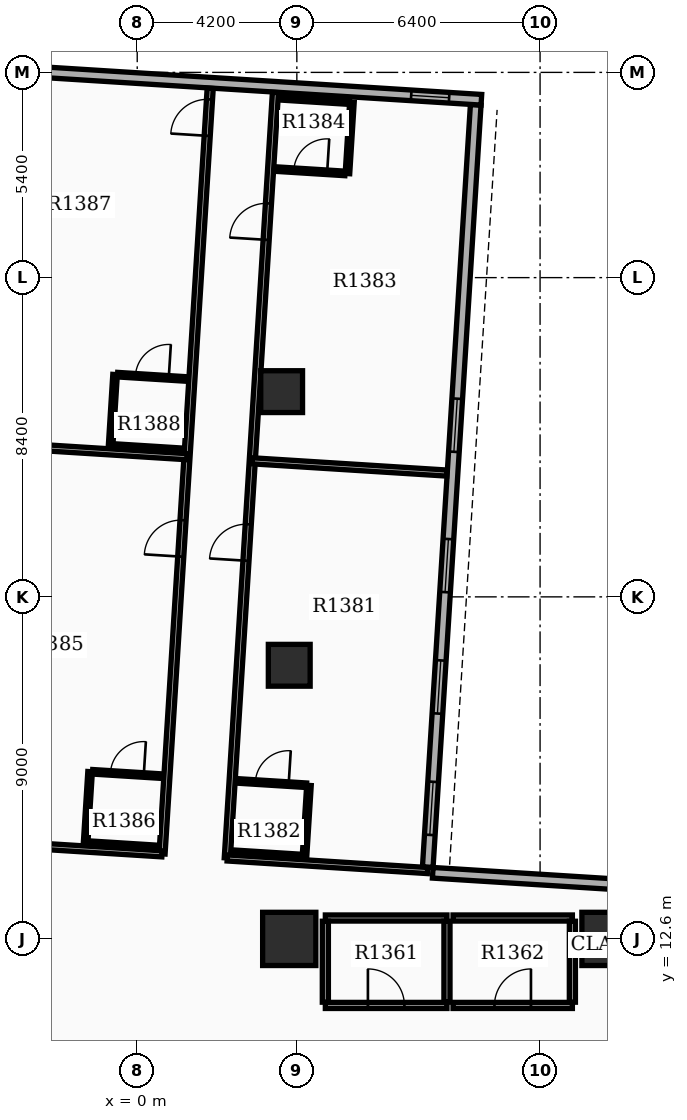
"""IFC4 building model, lengths in metres.
Left out: names, types, materials, properties, quantities, classifications, styles, units other than length and angle.
Written with IfcOpenShell. Run it as: python <this file> out.ifc"""

import sys

from ifc_helpers import new_model, si_unit, direction, frame, frame_2d, origin, origin_2d, place, context, subcontext, project, spatial, rectangle, extrude, element, fill, save


model = new_model("IFC4")
c1 = context("Model", 3, precision=1e-05, world=origin(), true_north=direction((0.0, 1.0)))
c2 = subcontext(c1, "Body", "Model", "MODEL_VIEW")
j1 = project(units=[si_unit("LENGTHUNIT", "METRE"), si_unit("PLANEANGLEUNIT", "RADIAN")], contexts=[c1])
p1 = place(None, origin())
s1 = spatial("IfcSite", under=j1, at=p1, CompositionType="ELEMENT")
p2 = place(p1, origin())
s2 = spatial("IfcBuilding", under=s1, at=p2, CompositionType="ELEMENT")
p3 = place(p2, frame((0.0, 0.0, 87.3)))
s3 = spatial("IfcBuildingStorey", under=s2, at=p3, CompositionType="ELEMENT", Elevation=87.3)
for number, where, z_axis, x_axis in (
    (1, (12.4, 12.6, 0.0), (0.0, 0.0, 1.0), (1.0, 0.0, 0.0)),
    (2, (4.0, 12.6, 0.0), (0.0, 0.0, 1.0), (1.0, 0.0, 0.0)),
):
    element("IfcColumn", number, at=place(p3, frame(where, z_axis=z_axis, x_axis=x_axis)), inside=s3, PredefinedType="COLUMN", context=c2, shape_type="SweptSolid", body=[
        extrude(rectangle(XDim=1.4, YDim=1.4, at=origin_2d()), origin(), (0.0, 0.0, 1.0), 3.9),
    ])
for number, where, z_axis, x_axis in (
    (3, (4.0, 19.8, 0.0), (0.0, 0.0, 1.0), (1.0, 0.0, 0.0)),
    (4, (3.8, 27.0, 0.0), (0.0, 0.0, 1.0), (1.0, 0.0, 0.0)),
):
    element("IfcColumn", number, at=place(p3, frame(where, z_axis=z_axis, x_axis=x_axis)), inside=s3, PredefinedType="COLUMN", context=c2, shape_type="SweptSolid", body=[
        extrude(rectangle(XDim=1.1, YDim=1.1, at=origin_2d()), origin(), (0.0, 0.0, 1.0), 3.9),
    ])
p4 = place(p3, frame((7.645, 14.489, 0.0), z_axis=(0.0, 0.0, 1.0), x_axis=(0.06279645424, 0.99802635503, 0.0)))
e5 = element("IfcWall", 5, at=p4, inside=s3, PredefinedType="STANDARD", context=c2, shape_type="SweptSolid", body=[
    extrude(rectangle(XDim=20.1, YDim=0.28, at=frame_2d((10.05, 0.0))), origin(), (0.0, 0.0, 1.0), 2.91),
])
p5 = place(p4, frame((0.85, 0.0, 0.8)))
e6 = element("IfcOpeningElement", 6, at=p5, cuts=e5, PredefinedType="OPENING", context=c2, shape_type="SweptSolid", body=[
    extrude(rectangle(XDim=1.4, YDim=1.6, at=frame_2d((0.7, 0.8))), frame((0.0, 0.15, 0.0), z_axis=(0.0, -1.0, 0.0), x_axis=(1.0, 0.0, 0.0)), (0.0, 0.0, 1.0), 0.3),
])
p6 = place(p4, frame((4.05, 0.0, 0.8)))
e7 = element("IfcOpeningElement", 7, at=p6, cuts=e5, PredefinedType="OPENING", context=c2, shape_type="SweptSolid", body=[
    extrude(rectangle(XDim=1.4, YDim=1.6, at=frame_2d((0.7, 0.8))), frame((0.0, 0.15, 0.0), z_axis=(0.0, -1.0, 0.0), x_axis=(1.0, 0.0, 0.0)), (0.0, 0.0, 1.0), 0.3),
])
p7 = place(p4, frame((7.25, 0.0, 0.8)))
e8 = element("IfcOpeningElement", 8, at=p7, cuts=e5, PredefinedType="OPENING", context=c2, shape_type="SweptSolid", body=[
    extrude(rectangle(XDim=1.4, YDim=1.6, at=frame_2d((0.7, 0.8))), frame((0.0, 0.15, 0.0), z_axis=(0.0, -1.0, 0.0), x_axis=(1.0, 0.0, 0.0)), (0.0, 0.0, 1.0), 0.3),
])
p8 = place(p4, frame((10.95, 0.0, 0.8)))
e9 = element("IfcOpeningElement", 9, at=p8, cuts=e5, PredefinedType="OPENING", context=c2, shape_type="SweptSolid", body=[
    extrude(rectangle(XDim=1.4, YDim=1.6, at=frame_2d((0.7, 0.8))), frame((0.0, 0.15, 0.0), z_axis=(0.0, -1.0, 0.0), x_axis=(1.0, 0.0, 0.0)), (0.0, 0.0, 1.0), 0.3),
])
p9 = place(p3, frame((9.055, 34.68, 0.0), z_axis=(0.0, 0.0, 1.0), x_axis=(-0.998026318072, 0.062797041623, 0.0)))
e10 = element("IfcWall", 10, at=p9, inside=s3, PredefinedType="STANDARD", context=c2, shape_type="SweptSolid", body=[
    extrude(rectangle(XDim=13.72, YDim=0.28, at=frame_2d((6.86, 0.0))), origin(), (0.0, 0.0, 1.0), 2.91),
])
p10 = place(p9, frame((0.85, 0.0, 0.85)))
e11 = element("IfcOpeningElement", 11, at=p10, cuts=e10, PredefinedType="OPENING", context=c2, shape_type="SweptSolid", body=[
    extrude(rectangle(XDim=1.0, YDim=1.5, at=frame_2d((0.5, 0.75))), frame((0.0, 0.15, 0.0), z_axis=(0.0, -1.0, 0.0), x_axis=(1.0, 0.0, 0.0)), (0.0, 0.0, 1.0), 0.3),
])
p11 = place(p3, frame((14.063, 13.945, 0.0), z_axis=(0.0, 0.0, 1.0), x_axis=(-0.998027314704, 0.062781200242, 0.0)))
e12 = element("IfcWall", 12, at=p11, inside=s3, PredefinedType="STANDARD", context=c2, shape_type="SweptSolid", body=[
    extrude(rectangle(XDim=6.3, YDim=0.28, at=frame_2d((3.15, 0.0))), origin(), (0.0, 0.0, 1.0), 2.91),
])
p12 = place(p3, frame((4.95, 10.85, 0.0), z_axis=(0.0, 0.0, 1.0), x_axis=(1.0, 0.0, 0.0)))
e13 = element("IfcWall", 13, at=p12, inside=s3, PredefinedType="PARTITIONING", context=c2, shape_type="SweptSolid", body=[
    extrude(rectangle(XDim=3.2, YDim=0.16, at=frame_2d((1.6, 0.0))), origin(), (0.0, 0.0, 1.0), 2.9),
])
p13 = place(p12, frame((1.12, 0.0, 0.0)))
e14 = element("IfcOpeningElement", 14, at=p13, cuts=e13, PredefinedType="OPENING", context=c2, shape_type="SweptSolid", body=[
    extrude(rectangle(XDim=0.96, YDim=2.15, at=frame_2d((0.48, 1.075))), frame((0.0, 0.09, 0.0), z_axis=(0.0, -1.0, 0.0), x_axis=(1.0, 0.0, 0.0)), (0.0, 0.0, 1.0), 0.18),
])
p14 = place(p3, frame((4.95, 13.15, 0.0), z_axis=(0.0, 0.0, 1.0), x_axis=(1.0, 0.0, 0.0)))
e15 = element("IfcWall", 15, at=p14, inside=s3, PredefinedType="PARTITIONING", context=c2, shape_type="SweptSolid", body=[
    extrude(rectangle(XDim=3.2, YDim=0.16, at=frame_2d((1.6, 0.0))), origin(), (0.0, 0.0, 1.0), 2.9),
])
for number, where, z_axis, x_axis in (
    (16, (4.95, 10.935, 0.0), (0.0, 0.0, 1.0), (0.0, 1.0, 0.0)),
    (17, (8.15, 10.935, 0.0), (0.0, 0.0, 1.0), (0.0, 1.0, 0.0)),
):
    element("IfcWall", number, at=place(p3, frame(where, z_axis=z_axis, x_axis=x_axis)), inside=s3, PredefinedType="PARTITIONING", context=c2, shape_type="SweptSolid", body=[
        extrude(rectangle(XDim=2.13, YDim=0.16, at=frame_2d((1.065, 0.0))), origin(), (0.0, 0.0, 1.0), 2.9),
    ])
p15 = place(p3, frame((8.31, 10.85, 0.0), z_axis=(0.0, 0.0, 1.0), x_axis=(1.0, 0.0, 0.0)))
e18 = element("IfcWall", 18, at=p15, inside=s3, PredefinedType="PARTITIONING", context=c2, shape_type="SweptSolid", body=[
    extrude(rectangle(XDim=3.14, YDim=0.16, at=frame_2d((1.57, 0.0))), origin(), (0.0, 0.0, 1.0), 2.9),
])
p16 = place(p15, frame((1.09, 0.0, 0.0)))
e19 = element("IfcOpeningElement", 19, at=p16, cuts=e18, PredefinedType="OPENING", context=c2, shape_type="SweptSolid", body=[
    extrude(rectangle(XDim=0.96, YDim=2.15, at=frame_2d((0.48, 1.075))), frame((0.0, 0.09, 0.0), z_axis=(0.0, -1.0, 0.0), x_axis=(1.0, 0.0, 0.0)), (0.0, 0.0, 1.0), 0.18),
])
p17 = place(p3, frame((8.31, 13.15, 0.0), z_axis=(0.0, 0.0, 1.0), x_axis=(1.0, 0.0, 0.0)))
e20 = element("IfcWall", 20, at=p17, inside=s3, PredefinedType="PARTITIONING", context=c2, shape_type="SweptSolid", body=[
    extrude(rectangle(XDim=3.14, YDim=0.16, at=frame_2d((1.57, 0.0))), origin(), (0.0, 0.0, 1.0), 2.9),
])
p18 = place(p3, frame((11.45, 10.935, 0.0), z_axis=(0.0, 0.0, 1.0), x_axis=(0.0, 1.0, 0.0)))
e21 = element("IfcWall", 21, at=p18, inside=s3, PredefinedType="PARTITIONING", context=c2, shape_type="SweptSolid", body=[
    extrude(rectangle(XDim=2.13, YDim=0.16, at=frame_2d((1.065, 0.0))), origin(), (0.0, 0.0, 1.0), 2.9),
])
p19 = place(p3, frame((2.37, 14.73, 0.0), z_axis=(0.0, 0.0, 1.0), x_axis=(0.062783460104, 0.998027172545, 0.0)))
e22 = element("IfcWall", 22, at=p19, inside=s3, PredefinedType="PARTITIONING", context=c2, shape_type="SweptSolid", body=[
    extrude(rectangle(XDim=20.182, YDim=0.16, at=frame_2d((10.091, 0.0))), origin(), (0.0, 0.0, 1.0), 2.9),
])
p20 = place(p19, frame((7.836, 0.0, 0.0)))
e23 = element("IfcOpeningElement", 23, at=p20, cuts=e22, PredefinedType="OPENING", context=c2, shape_type="SweptSolid", body=[
    extrude(rectangle(XDim=0.96, YDim=2.15, at=frame_2d((0.48, 1.075))), frame((0.0, 0.09, 0.0), z_axis=(0.0, -1.0, 0.0), x_axis=(1.0, 0.0, 0.0)), (0.0, 0.0, 1.0), 0.18),
])
p21 = place(p19, frame((16.296, 0.0, 0.0)))
e24 = element("IfcOpeningElement", 24, at=p21, cuts=e22, PredefinedType="OPENING", context=c2, shape_type="SweptSolid", body=[
    extrude(rectangle(XDim=0.96, YDim=2.15, at=frame_2d((0.48, 1.075))), frame((0.0, 0.09, 0.0), z_axis=(0.0, -1.0, 0.0), x_axis=(1.0, 0.0, 0.0)), (0.0, 0.0, 1.0), 0.18),
])
p22 = place(p3, frame((2.37, 14.73, 0.0), z_axis=(0.0, 0.0, 1.0), x_axis=(0.998026584059, -0.062792814175, 0.0)))
e25 = element("IfcWall", 25, at=p22, inside=s3, PredefinedType="PARTITIONING", context=c2, shape_type="SweptSolid", body=[
    extrude(rectangle(XDim=5.28, YDim=0.16, at=frame_2d((2.64, 0.0))), origin(), (0.0, 0.0, 1.0), 2.9),
])
p23 = place(p3, frame((3.027, 25.18, 0.0), z_axis=(0.0, 0.0, 1.0), x_axis=(0.998026390953, -0.062795883315, 0.0)))
e26 = element("IfcWall", 26, at=p23, inside=s3, PredefinedType="PARTITIONING", context=c2, shape_type="SweptSolid", body=[
    extrude(rectangle(XDim=5.132, YDim=0.16, at=frame_2d((2.566, 0.0))), origin(), (0.0, 0.0, 1.0), 2.9),
])
p24 = place(p3, frame((2.637, 16.758, 0.0), z_axis=(0.0, 0.0, 1.0), x_axis=(0.998027443946, -0.062779145668, 0.0)))
e27 = element("IfcWall", 27, at=p24, inside=s3, PredefinedType="PARTITIONING", context=c2, shape_type="SweptSolid", body=[
    extrude(rectangle(XDim=1.82, YDim=0.12, at=frame_2d((0.91, 0.0))), origin(), (0.0, 0.0, 1.0), 2.9),
])
p25 = place(p24, frame((0.47, 0.0, 0.0)))
e28 = element("IfcOpeningElement", 28, at=p25, cuts=e27, PredefinedType="OPENING", context=c2, shape_type="SweptSolid", body=[
    extrude(rectangle(XDim=0.88, YDim=2.1, at=frame_2d((0.44, 1.05))), frame((0.0, 0.07, 0.0), z_axis=(0.0, -1.0, 0.0), x_axis=(1.0, 0.0, 0.0)), (0.0, 0.0, 1.0), 0.14),
])
p26 = place(p3, frame((2.519, 14.881, 0.0), z_axis=(0.0, 0.0, 1.0), x_axis=(0.998027443946, -0.062779145668, 0.0)))
e29 = element("IfcWall", 29, at=p26, inside=s3, PredefinedType="PARTITIONING", context=c2, shape_type="SweptSolid", body=[
    extrude(rectangle(XDim=1.82, YDim=0.12, at=frame_2d((0.91, 0.0))), origin(), (0.0, 0.0, 1.0), 2.9),
])
p27 = place(p3, frame((4.401, 14.763, 0.0), z_axis=(0.0, 0.0, 1.0), x_axis=(0.062847152131, 0.998023163794, 0.0)))
e30 = element("IfcWall", 30, at=p27, inside=s3, PredefinedType="PARTITIONING", context=c2, shape_type="SweptSolid", body=[
    extrude(rectangle(XDim=1.88, YDim=0.12, at=frame_2d((0.94, 0.0))), origin(), (0.0, 0.0, 1.0), 2.9),
])
p28 = place(p3, frame((3.65, 32.856, 0.0), z_axis=(0.0, 0.0, 1.0), x_axis=(0.998027443946, -0.062779145668, 0.0)))
e31 = element("IfcWall", 31, at=p28, inside=s3, PredefinedType="PARTITIONING", context=c2, shape_type="SweptSolid", body=[
    extrude(rectangle(XDim=1.82, YDim=0.12, at=frame_2d((0.91, 0.0))), origin(), (0.0, 0.0, 1.0), 2.9),
])
p29 = place(p28, frame((0.47, 0.0, 0.0)))
e32 = element("IfcOpeningElement", 32, at=p29, cuts=e31, PredefinedType="OPENING", context=c2, shape_type="SweptSolid", body=[
    extrude(rectangle(XDim=0.88, YDim=2.1, at=frame_2d((0.44, 1.05))), frame((0.0, 0.07, 0.0), z_axis=(0.0, -1.0, 0.0), x_axis=(1.0, 0.0, 0.0)), (0.0, 0.0, 1.0), 0.14),
])
p30 = place(p3, frame((3.768, 34.732, 0.0), z_axis=(0.0, 0.0, 1.0), x_axis=(0.998027443946, -0.062779145668, 0.0)))
e33 = element("IfcWall", 33, at=p30, inside=s3, PredefinedType="PARTITIONING", context=c2, shape_type="SweptSolid", body=[
    extrude(rectangle(XDim=1.82, YDim=0.12, at=frame_2d((0.91, 0.0))), origin(), (0.0, 0.0, 1.0), 2.9),
])
p31 = place(p3, frame((5.531, 32.737, 0.0), z_axis=(0.0, 0.0, 1.0), x_axis=(0.062855297722, 0.998022650819, 0.0)))
e34 = element("IfcWall", 34, at=p31, inside=s3, PredefinedType="PARTITIONING", context=c2, shape_type="SweptSolid", body=[
    extrude(rectangle(XDim=1.88, YDim=0.12, at=frame_2d((0.94, 0.0))), origin(), (0.0, 0.0, 1.0), 2.9),
])
p32 = place(p3, frame((0.653, 14.838, 0.0), z_axis=(0.0, 0.0, 1.0), x_axis=(0.062783460104, 0.998027172545, 0.0)))
e35 = element("IfcWall", 35, at=p32, inside=s3, PredefinedType="PARTITIONING", context=c2, shape_type="SweptSolid", body=[
    extrude(rectangle(XDim=20.182, YDim=0.16, at=frame_2d((10.091, 0.0))), origin(), (0.0, 0.0, 1.0), 2.9),
])
p33 = place(p32, frame((7.836, 0.0, 0.0)))
e36 = element("IfcOpeningElement", 36, at=p33, cuts=e35, PredefinedType="OPENING", context=c2, shape_type="SweptSolid", body=[
    extrude(rectangle(XDim=0.96, YDim=2.15, at=frame_2d((0.48, 1.075))), frame((0.0, 0.09, 0.0), z_axis=(0.0, -1.0, 0.0), x_axis=(1.0, 0.0, 0.0)), (0.0, 0.0, 1.0), 0.18),
])
p34 = place(p32, frame((18.93, 0.0, 0.0)))
e37 = element("IfcOpeningElement", 37, at=p34, cuts=e35, PredefinedType="OPENING", context=c2, shape_type="SweptSolid", body=[
    extrude(rectangle(XDim=0.96, YDim=2.15, at=frame_2d((0.48, 1.075))), frame((0.0, 0.09, 0.0), z_axis=(0.0, -1.0, 0.0), x_axis=(1.0, 0.0, 0.0)), (0.0, 0.0, 1.0), 0.18),
])
p35 = place(p3, frame((0.653, 14.838, 0.0), z_axis=(0.0, 0.0, 1.0), x_axis=(-0.998027570366, 0.062777135888, 0.0)))
e38 = element("IfcWall", 38, at=p35, inside=s3, PredefinedType="PARTITIONING", context=c2, shape_type="SweptSolid", body=[
    extrude(rectangle(XDim=6.44, YDim=0.16, at=frame_2d((3.22, 0.0))), origin(), (0.0, 0.0, 1.0), 2.9),
])
p36 = place(p3, frame((1.31, 25.288, 0.0), z_axis=(0.0, 0.0, 1.0), x_axis=(-0.998027283173, 0.062781701496, 0.0)))
e39 = element("IfcWall", 39, at=p36, inside=s3, PredefinedType="PARTITIONING", context=c2, shape_type="SweptSolid", body=[
    extrude(rectangle(XDim=6.292, YDim=0.16, at=frame_2d((3.146, 0.0))), origin(), (0.0, 0.0, 1.0), 2.9),
])
p37 = place(p3, frame((-1.175, 16.997, 0.0), z_axis=(0.0, 0.0, 1.0), x_axis=(0.998027443946, -0.062779145668, 0.0)))
e40 = element("IfcWall", 40, at=p37, inside=s3, PredefinedType="PARTITIONING", context=c2, shape_type="SweptSolid", body=[
    extrude(rectangle(XDim=1.82, YDim=0.12, at=frame_2d((0.91, 0.0))), origin(), (0.0, 0.0, 1.0), 2.9),
])
p38 = place(p37, frame((0.47, 0.0, 0.0)))
e41 = element("IfcOpeningElement", 41, at=p38, cuts=e40, PredefinedType="OPENING", context=c2, shape_type="SweptSolid", body=[
    extrude(rectangle(XDim=0.88, YDim=2.1, at=frame_2d((0.44, 1.05))), frame((0.0, 0.07, 0.0), z_axis=(0.0, -1.0, 0.0), x_axis=(1.0, 0.0, 0.0)), (0.0, 0.0, 1.0), 0.14),
])
p39 = place(p3, frame((-1.293, 15.121, 0.0), z_axis=(0.0, 0.0, 1.0), x_axis=(0.998027443946, -0.062779145668, 0.0)))
e42 = element("IfcWall", 42, at=p39, inside=s3, PredefinedType="PARTITIONING", context=c2, shape_type="SweptSolid", body=[
    extrude(rectangle(XDim=1.82, YDim=0.12, at=frame_2d((0.91, 0.0))), origin(), (0.0, 0.0, 1.0), 2.9),
])
p40 = place(p3, frame((-1.358, 15.125, 0.0), z_axis=(0.0, 0.0, 1.0), x_axis=(0.062717813936, 0.998031300018, 0.0)))
e43 = element("IfcWall", 43, at=p40, inside=s3, PredefinedType="PARTITIONING", context=c2, shape_type="SweptSolid", body=[
    extrude(rectangle(XDim=1.88, YDim=0.12, at=frame_2d((0.94, 0.0))), origin(), (0.0, 0.0, 1.0), 2.9),
])
p41 = place(p3, frame((-0.518, 27.447, 0.0), z_axis=(0.0, 0.0, 1.0), x_axis=(0.998027443946, -0.062779145668, 0.0)))
e44 = element("IfcWall", 44, at=p41, inside=s3, PredefinedType="PARTITIONING", context=c2, shape_type="SweptSolid", body=[
    extrude(rectangle(XDim=1.82, YDim=0.12, at=frame_2d((0.91, 0.0))), origin(), (0.0, 0.0, 1.0), 2.9),
])
p42 = place(p41, frame((0.47, 0.0, 0.0)))
e45 = element("IfcOpeningElement", 45, at=p42, cuts=e44, PredefinedType="OPENING", context=c2, shape_type="SweptSolid", body=[
    extrude(rectangle(XDim=0.88, YDim=2.1, at=frame_2d((0.44, 1.05))), frame((0.0, 0.07, 0.0), z_axis=(0.0, -1.0, 0.0), x_axis=(1.0, 0.0, 0.0)), (0.0, 0.0, 1.0), 0.14),
])
p43 = place(p3, frame((-0.636, 25.57, 0.0), z_axis=(0.0, 0.0, 1.0), x_axis=(0.998027443946, -0.062779145668, 0.0)))
e46 = element("IfcWall", 46, at=p43, inside=s3, PredefinedType="PARTITIONING", context=c2, shape_type="SweptSolid", body=[
    extrude(rectangle(XDim=1.82, YDim=0.12, at=frame_2d((0.91, 0.0))), origin(), (0.0, 0.0, 1.0), 2.9),
])
p44 = place(p3, frame((-0.7, 25.574, 0.0), z_axis=(0.0, 0.0, 1.0), x_axis=(0.062725942896, 0.998030789148, 0.0)))
e47 = element("IfcWall", 47, at=p44, inside=s3, PredefinedType="PARTITIONING", context=c2, shape_type="SweptSolid", body=[
    extrude(rectangle(XDim=1.88, YDim=0.12, at=frame_2d((0.94, 0.0))), origin(), (0.0, 0.0, 1.0), 2.9),
])
p45 = place(p5, origin())
e48 = element("IfcWindow", 48, at=p45, inside=s3, PartitioningType="SINGLE_PANEL", PredefinedType="WINDOW", context=c2, shape_type="SweptSolid", body=[
    extrude(rectangle(XDim=1.4, YDim=1.6, at=frame_2d((0.7, 0.8))), frame((0.0, 0.03, 0.0), z_axis=(0.0, -1.0, 0.0), x_axis=(1.0, 0.0, 0.0)), (0.0, 0.0, 1.0), 0.06),
])
fill(e6, e48)
p46 = place(p6, origin())
e49 = element("IfcWindow", 49, at=p46, inside=s3, PartitioningType="SINGLE_PANEL", PredefinedType="WINDOW", context=c2, shape_type="SweptSolid", body=[
    extrude(rectangle(XDim=1.4, YDim=1.6, at=frame_2d((0.7, 0.8))), frame((0.0, 0.03, 0.0), z_axis=(0.0, -1.0, 0.0), x_axis=(1.0, 0.0, 0.0)), (0.0, 0.0, 1.0), 0.06),
])
fill(e7, e49)
p47 = place(p7, origin())
e50 = element("IfcWindow", 50, at=p47, inside=s3, PartitioningType="SINGLE_PANEL", PredefinedType="WINDOW", context=c2, shape_type="SweptSolid", body=[
    extrude(rectangle(XDim=1.4, YDim=1.6, at=frame_2d((0.7, 0.8))), frame((0.0, 0.03, 0.0), z_axis=(0.0, -1.0, 0.0), x_axis=(1.0, 0.0, 0.0)), (0.0, 0.0, 1.0), 0.06),
])
fill(e8, e50)
p48 = place(p8, origin())
e51 = element("IfcWindow", 51, at=p48, inside=s3, PartitioningType="SINGLE_PANEL", PredefinedType="WINDOW", context=c2, shape_type="SweptSolid", body=[
    extrude(rectangle(XDim=1.4, YDim=1.6, at=frame_2d((0.7, 0.8))), frame((0.0, 0.03, 0.0), z_axis=(0.0, -1.0, 0.0), x_axis=(1.0, 0.0, 0.0)), (0.0, 0.0, 1.0), 0.06),
])
fill(e9, e51)
p49 = place(p10, origin())
e52 = element("IfcWindow", 52, at=p49, inside=s3, PartitioningType="SINGLE_PANEL", PredefinedType="WINDOW", context=c2, shape_type="SweptSolid", body=[
    extrude(rectangle(XDim=1.0, YDim=1.5, at=frame_2d((0.5, 0.75))), frame((0.0, 0.03, 0.0), z_axis=(0.0, -1.0, 0.0), x_axis=(1.0, 0.0, 0.0)), (0.0, 0.0, 1.0), 0.06),
])
fill(e11, e52)
p50 = place(p13, origin())
e53 = element("IfcDoor", 53, at=p50, inside=s3, OperationType="SINGLE_SWING_LEFT", PredefinedType="DOOR", context=c2, shape_type="SweptSolid", body=[
    extrude(rectangle(XDim=0.96, YDim=2.15, at=frame_2d((0.48, 1.075))), frame((0.0, 0.025, 0.0), z_axis=(0.0, -1.0, 0.0), x_axis=(1.0, 0.0, 0.0)), (0.0, 0.0, 1.0), 0.05),
])
fill(e14, e53)
p51 = place(p16, origin())
e54 = element("IfcDoor", 54, at=p51, inside=s3, OperationType="SINGLE_SWING_RIGHT", PredefinedType="DOOR", context=c2, shape_type="SweptSolid", body=[
    extrude(rectangle(XDim=0.96, YDim=2.15, at=frame_2d((0.48, 1.075))), frame((0.0, 0.025, 0.0), z_axis=(0.0, -1.0, 0.0), x_axis=(1.0, 0.0, 0.0)), (0.0, 0.0, 1.0), 0.05),
])
fill(e19, e54)
p52 = place(p20, origin())
e55 = element("IfcDoor", 55, at=p52, inside=s3, OperationType="SINGLE_SWING_LEFT", PredefinedType="DOOR", context=c2, shape_type="SweptSolid", body=[
    extrude(rectangle(XDim=0.96, YDim=2.15, at=frame_2d((0.48, 1.075))), frame((0.0, 0.025, 0.0), z_axis=(0.0, -1.0, 0.0), x_axis=(1.0, 0.0, 0.0)), (0.0, 0.0, 1.0), 0.05),
])
fill(e23, e55)
p53 = place(p25, origin())
e56 = element("IfcDoor", 56, at=p53, inside=s3, OperationType="SINGLE_SWING_RIGHT", PredefinedType="DOOR", context=c2, shape_type="SweptSolid", body=[
    extrude(rectangle(XDim=0.88, YDim=2.1, at=frame_2d((0.44, 1.05))), frame((0.0, 0.025, 0.0), z_axis=(0.0, -1.0, 0.0), x_axis=(1.0, 0.0, 0.0)), (0.0, 0.0, 1.0), 0.05),
])
fill(e28, e56)
p54 = place(p21, origin())
e57 = element("IfcDoor", 57, at=p54, inside=s3, OperationType="SINGLE_SWING_LEFT", PredefinedType="DOOR", context=c2, shape_type="SweptSolid", body=[
    extrude(rectangle(XDim=0.96, YDim=2.15, at=frame_2d((0.48, 1.075))), frame((0.0, 0.025, 0.0), z_axis=(0.0, -1.0, 0.0), x_axis=(1.0, 0.0, 0.0)), (0.0, 0.0, 1.0), 0.05),
])
fill(e24, e57)
p55 = place(p29, origin())
e58 = element("IfcDoor", 58, at=p55, inside=s3, OperationType="SINGLE_SWING_RIGHT", PredefinedType="DOOR", context=c2, shape_type="SweptSolid", body=[
    extrude(rectangle(XDim=0.88, YDim=2.1, at=frame_2d((0.44, 1.05))), frame((0.0, 0.025, 0.0), z_axis=(0.0, -1.0, 0.0), x_axis=(1.0, 0.0, 0.0)), (0.0, 0.0, 1.0), 0.05),
])
fill(e32, e58)
p56 = place(p33, origin())
e59 = element("IfcDoor", 59, at=p56, inside=s3, OperationType="SINGLE_SWING_LEFT", PredefinedType="DOOR", context=c2, shape_type="SweptSolid", body=[
    extrude(rectangle(XDim=0.96, YDim=2.15, at=frame_2d((0.48, 1.075))), frame((0.0, 0.025, 0.0), z_axis=(0.0, -1.0, 0.0), x_axis=(1.0, 0.0, 0.0)), (0.0, 0.0, 1.0), 0.05),
])
fill(e36, e59)
p57 = place(p38, origin())
e60 = element("IfcDoor", 60, at=p57, inside=s3, OperationType="SINGLE_SWING_RIGHT", PredefinedType="DOOR", context=c2, shape_type="SweptSolid", body=[
    extrude(rectangle(XDim=0.88, YDim=2.1, at=frame_2d((0.44, 1.05))), frame((0.0, 0.025, 0.0), z_axis=(0.0, -1.0, 0.0), x_axis=(1.0, 0.0, 0.0)), (0.0, 0.0, 1.0), 0.05),
])
fill(e41, e60)
p58 = place(p34, origin())
e61 = element("IfcDoor", 61, at=p58, inside=s3, OperationType="SINGLE_SWING_LEFT", PredefinedType="DOOR", context=c2, shape_type="SweptSolid", body=[
    extrude(rectangle(XDim=0.96, YDim=2.15, at=frame_2d((0.48, 1.075))), frame((0.0, 0.025, 0.0), z_axis=(0.0, -1.0, 0.0), x_axis=(1.0, 0.0, 0.0)), (0.0, 0.0, 1.0), 0.05),
])
fill(e37, e61)
p59 = place(p42, origin())
e62 = element("IfcDoor", 62, at=p59, inside=s3, OperationType="SINGLE_SWING_RIGHT", PredefinedType="DOOR", context=c2, shape_type="SweptSolid", body=[
    extrude(rectangle(XDim=0.88, YDim=2.1, at=frame_2d((0.44, 1.05))), frame((0.0, 0.025, 0.0), z_axis=(0.0, -1.0, 0.0), x_axis=(1.0, 0.0, 0.0)), (0.0, 0.0, 1.0), 0.05),
])
fill(e45, e62)
save(model, sys.argv[1])
